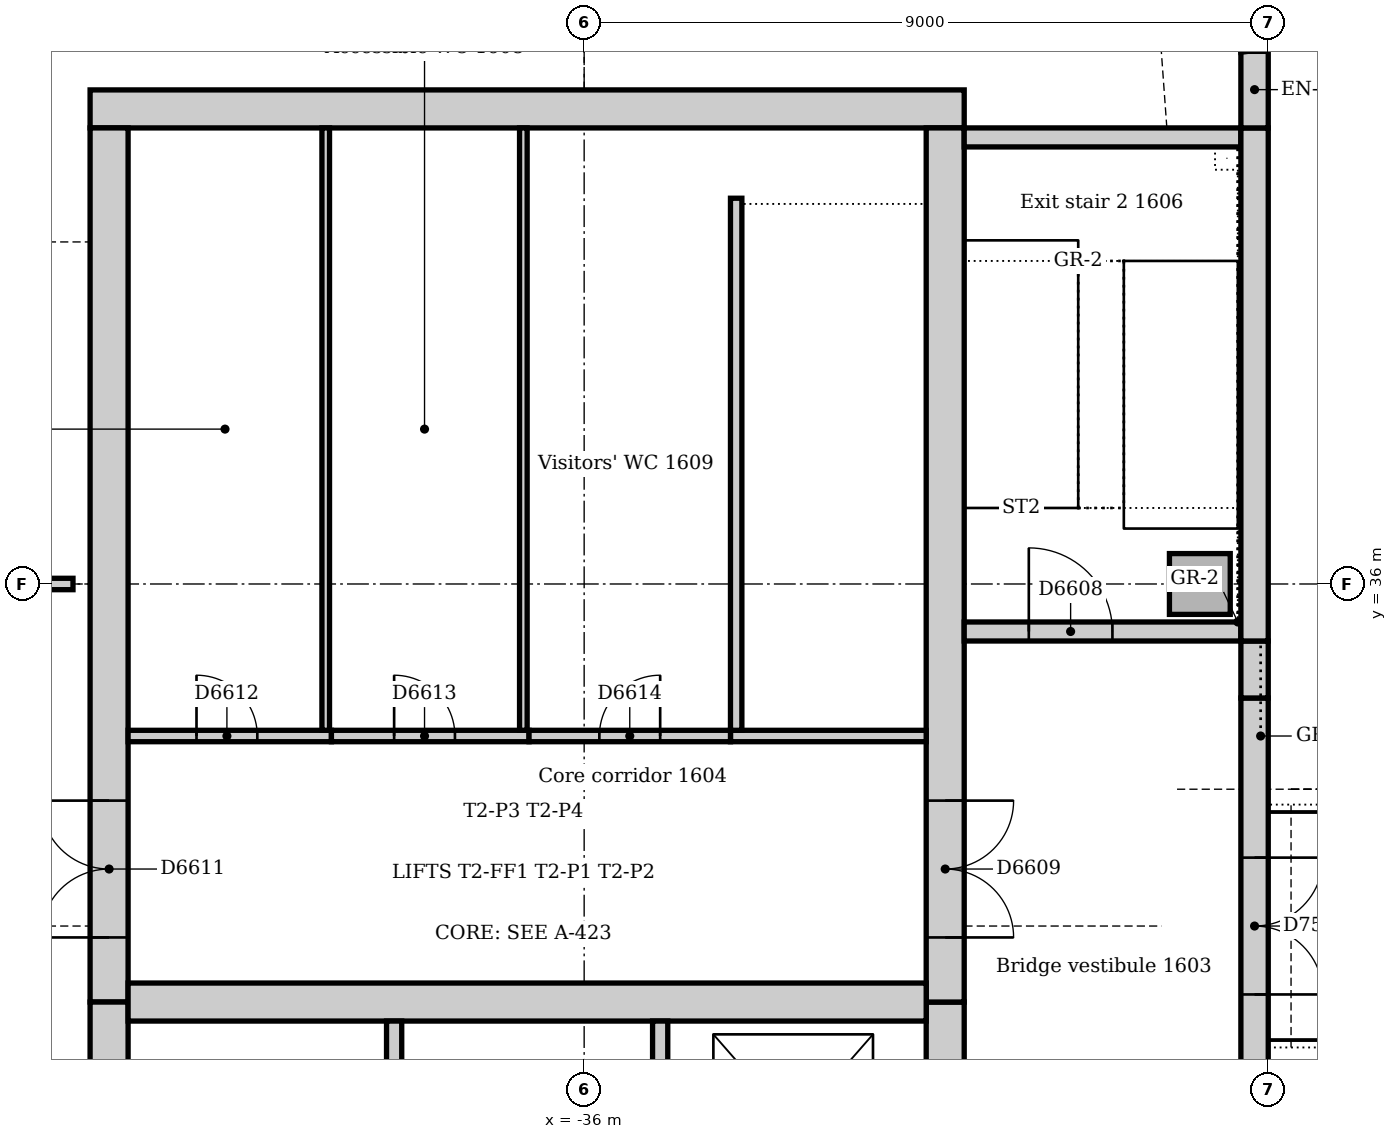
"""IFC4 building model, lengths in metres.
Left out: names, types, materials, properties, quantities, classifications, styles, units other than length and angle.
Written with IfcOpenShell. Run it as: python <this file> out.ifc"""

import sys

from ifc_helpers import new_model, si_unit, direction, frame, frame_2d, origin, origin_2d, place, context, subcontext, project, spatial, rectangle, extrude, element, fill, save


model = new_model("IFC4")
c1 = context("Model", 3, precision=1e-05, world=origin(), true_north=direction((0.0, 1.0)))
c2 = subcontext(c1, "Body", "Model", "MODEL_VIEW")
j1 = project(units=[si_unit("LENGTHUNIT", "METRE"), si_unit("PLANEANGLEUNIT", "RADIAN")], contexts=[c1])
p1 = place(None, origin())
s1 = spatial("IfcSite", under=j1, at=p1, CompositionType="ELEMENT")
p2 = place(p1, origin())
s2 = spatial("IfcBuilding", under=s1, at=p2, CompositionType="ELEMENT")
p3 = place(p2, frame((0.0, 0.0, 71.0)))
s3 = spatial("IfcBuildingStorey", under=s2, at=p3, CompositionType="ELEMENT", Elevation=71.0)
p4 = place(p3, frame((-31.0, 42.25, 0.0), z_axis=(0.0, 0.0, 1.0), x_axis=(-1.0, 0.0, 0.0)))
e1 = element("IfcWall", 1, at=p4, inside=s3, PredefinedType="SOLIDWALL", context=c2, shape_type="SweptSolid", body=[
    extrude(rectangle(XDim=11.5, YDim=0.5, at=frame_2d((5.75, 0.0))), origin(), (0.0, 0.0, 1.0), 4.0),
])
p5 = place(p3, frame((-31.25, 21.0, 0.0), z_axis=(0.0, 0.0, 1.0), x_axis=(0.0, 1.0, 0.0)))
e2 = element("IfcWall", 2, at=p5, inside=s3, PredefinedType="SOLIDWALL", context=c2, shape_type="SweptSolid", body=[
    extrude(rectangle(XDim=9.5, YDim=0.5, at=frame_2d((4.75, 0.0))), origin(), (0.0, 0.0, 1.0), 4.0),
])
p6 = place(p5, frame((5.25, 0.0, 0.0)))
e3 = element("IfcOpeningElement", 3, at=p6, cuts=e2, PredefinedType="OPENING", context=c2, shape_type="SweptSolid", body=[
    extrude(rectangle(XDim=1.0, YDim=2.1, at=frame_2d((0.5, 1.05))), frame((0.0, 0.26, 0.0), z_axis=(0.0, -1.0, 0.0), x_axis=(1.0, 0.0, 0.0)), (0.0, 0.0, 1.0), 0.52),
])
p7 = place(p3, frame((-31.25, 30.5, 0.0), z_axis=(0.0, 0.0, 1.0), x_axis=(0.0, 1.0, 0.0)))
e4 = element("IfcWall", 4, at=p7, inside=s3, PredefinedType="SOLIDWALL", context=c2, shape_type="SweptSolid", body=[
    extrude(rectangle(XDim=11.5, YDim=0.5, at=frame_2d((5.75, 0.0))), origin(), (0.0, 0.0, 1.0), 4.0),
])
p8 = place(p7, frame((0.85, 0.0, 0.0)))
e5 = element("IfcOpeningElement", 5, at=p8, cuts=e4, PredefinedType="OPENING", context=c2, shape_type="SweptSolid", body=[
    extrude(rectangle(XDim=1.8, YDim=2.1, at=frame_2d((0.9, 1.05))), frame((0.0, 0.26, 0.0), z_axis=(0.0, -1.0, 0.0), x_axis=(1.0, 0.0, 0.0)), (0.0, 0.0, 1.0), 0.52),
])
p9 = place(p3, frame((-42.25, 42.0, 0.0), z_axis=(0.0, 0.0, 1.0), x_axis=(0.0, -1.0, 0.0)))
e6 = element("IfcWall", 6, at=p9, inside=s3, PredefinedType="SOLIDWALL", context=c2, shape_type="SweptSolid", body=[
    extrude(rectangle(XDim=11.5, YDim=0.5, at=frame_2d((5.75, 0.0))), origin(), (0.0, 0.0, 1.0), 4.0),
])
p10 = place(p9, frame((8.85, 0.0, 0.0)))
e7 = element("IfcOpeningElement", 7, at=p10, cuts=e6, PredefinedType="OPENING", context=c2, shape_type="SweptSolid", body=[
    extrude(rectangle(XDim=1.8, YDim=2.1, at=frame_2d((0.9, 1.05))), frame((0.0, 0.26, 0.0), z_axis=(0.0, -1.0, 0.0), x_axis=(1.0, 0.0, 0.0)), (0.0, 0.0, 1.0), 0.52),
])
p11 = place(p3, frame((-42.25, 30.5, 0.0), z_axis=(0.0, 0.0, 1.0), x_axis=(0.0, -1.0, 0.0)))
e8 = element("IfcWall", 8, at=p11, inside=s3, PredefinedType="SOLIDWALL", context=c2, shape_type="SweptSolid", body=[
    extrude(rectangle(XDim=9.5, YDim=0.5, at=frame_2d((4.75, 0.0))), origin(), (0.0, 0.0, 1.0), 4.0),
])
p12 = place(p11, frame((3.85, 0.0, 0.0)))
e9 = element("IfcOpeningElement", 9, at=p12, cuts=e8, PredefinedType="OPENING", context=c2, shape_type="SweptSolid", body=[
    extrude(rectangle(XDim=1.8, YDim=2.1, at=frame_2d((0.9, 1.05))), frame((0.0, 0.26, 0.0), z_axis=(0.0, -1.0, 0.0), x_axis=(1.0, 0.0, 0.0)), (0.0, 0.0, 1.0), 0.52),
])
p13 = place(p3, frame((-42.0, 30.5, 0.0), z_axis=(0.0, 0.0, 1.0), x_axis=(1.0, 0.0, 0.0)))
e10 = element("IfcWall", 10, at=p13, inside=s3, PredefinedType="SOLIDWALL", context=c2, shape_type="SweptSolid", body=[
    extrude(rectangle(XDim=10.5, YDim=0.5, at=frame_2d((5.25, 0.0))), origin(), (0.0, 0.0, 1.0), 4.0),
])
p14 = place(p3, frame((-31.0, 35.375, 0.0), z_axis=(0.0, 0.0, 1.0), x_axis=(1.0, 0.0, 0.0)))
e11 = element("IfcWall", 11, at=p14, inside=s3, PredefinedType="SOLIDWALL", context=c2, shape_type="SweptSolid", body=[
    extrude(rectangle(XDim=3.64, YDim=0.25, at=frame_2d((1.82, 0.0))), origin(), (0.0, 0.0, 1.0), 4.0),
])
p15 = place(p14, frame((0.85, 0.0, 0.0)))
e12 = element("IfcOpeningElement", 12, at=p15, cuts=e11, PredefinedType="OPENING", context=c2, shape_type="SweptSolid", body=[
    extrude(rectangle(XDim=1.1, YDim=2.1, at=frame_2d((0.55, 1.05))), frame((0.0, 0.135, 0.0), z_axis=(0.0, -1.0, 0.0), x_axis=(1.0, 0.0, 0.0)), (0.0, 0.0, 1.0), 0.27),
])
p16 = place(p3, frame((-27.36, 41.875, 0.0), z_axis=(0.0, 0.0, 1.0), x_axis=(-1.0, 0.0, 0.0)))
e13 = element("IfcWall", 13, at=p16, inside=s3, PredefinedType="SOLIDWALL", context=c2, shape_type="SweptSolid", body=[
    extrude(rectangle(XDim=3.64, YDim=0.25, at=frame_2d((1.82, 0.0))), origin(), (0.0, 0.0, 1.0), 4.0),
])
p17 = place(p3, frame((-27.9, 36.0, 0.0), z_axis=(0.0, 0.0, 1.0), x_axis=(1.0, 0.0, 0.0)))
e14 = element("IfcColumn", 14, at=p17, inside=s3, PredefinedType="COLUMN", context=c2, shape_type="SweptSolid", body=[
    extrude(rectangle(XDim=0.8, YDim=0.8, at=origin_2d()), origin(), (0.0, 0.0, 1.0), 4.0),
])
p18 = place(p3, frame((-27.18, 28.5, 0.0), z_axis=(0.0, 0.0, 1.0), x_axis=(0.0, 1.0, 0.0)))
e15 = element("IfcWall", 15, at=p18, inside=s3, PredefinedType="STANDARD", context=c2, shape_type="SweptSolid", body=[
    extrude(rectangle(XDim=6.0, YDim=0.36, at=frame_2d((3.0, 0.0))), origin(), (0.0, 0.0, 1.0), 3.85),
])
p19 = place(p18, frame((2.1, 0.0, 0.0)))
e16 = element("IfcOpeningElement", 16, at=p19, cuts=e15, PredefinedType="OPENING", context=c2, shape_type="SweptSolid", body=[
    extrude(rectangle(XDim=1.8, YDim=2.4, at=frame_2d((0.9, 1.2))), frame((0.0, 0.19, 0.0), z_axis=(0.0, -1.0, 0.0), x_axis=(1.0, 0.0, 0.0)), (0.0, 0.0, 1.0), 0.38),
])
p20 = place(p3, frame((-27.18, 34.5, 0.0), z_axis=(0.0, 0.0, 1.0), x_axis=(0.0, 1.0, 0.0)))
e17 = element("IfcWall", 17, at=p20, inside=s3, PredefinedType="STANDARD", context=c2, shape_type="SweptSolid", body=[
    extrude(rectangle(XDim=0.75, YDim=0.36, at=frame_2d((0.375, 0.0))), origin(), (0.0, 0.0, 1.0), 3.85),
])
p21 = place(p3, frame((-27.18, 35.25, 0.0), z_axis=(0.0, 0.0, 1.0), x_axis=(0.0, 1.0, 0.0)))
e18 = element("IfcWall", 18, at=p21, inside=s3, PredefinedType="STANDARD", context=c2, shape_type="SweptSolid", body=[
    extrude(rectangle(XDim=6.75, YDim=0.36, at=frame_2d((3.375, 0.0))), origin(), (0.0, 0.0, 1.0), 3.85),
])
p22 = place(p3, frame((-27.18, 42.0, 0.0), z_axis=(0.0, 0.0, 1.0), x_axis=(0.0, 1.0, 0.0)))
e19 = element("IfcWall", 19, at=p22, inside=s3, PredefinedType="STANDARD", context=c2, shape_type="SweptSolid", body=[
    extrude(rectangle(XDim=1.007, YDim=0.36, at=frame_2d((0.504, 0.0))), origin(), (0.0, 0.0, 1.0), 3.85),
])
p23 = place(p3, frame((-27.183, 43.019, 0.0), z_axis=(0.0, 0.0, 1.0), x_axis=(-0.13055608231, 0.99144092581, 0.0)))
e20 = element("IfcWall", 20, at=p23, inside=s3, PredefinedType="STANDARD", context=c2, shape_type="SweptSolid", body=[
    extrude(rectangle(XDim=0.713, YDim=0.36, at=frame_2d((0.356, 0.0))), origin(), (0.0, 0.0, 1.0), 3.85),
])
for number, where, z_axis, x_axis in (
    (21, (-38.5, 27.4, 0.0), (0.0, 0.0, 1.0), (0.0, 1.0, 0.0)),
    (22, (-35.0, 27.4, 0.0), (0.0, 0.0, 1.0), (0.0, 1.0, 0.0)),
):
    element("IfcWall", number, at=place(p3, frame(where, z_axis=z_axis, x_axis=x_axis)), inside=s3, PredefinedType="SOLIDWALL", context=c2, shape_type="SweptSolid", body=[
        extrude(rectangle(XDim=2.85, YDim=0.2, at=frame_2d((1.425, 0.0))), origin(), (0.0, 0.0, 1.0), 4.0),
    ])
p24 = place(p3, frame((-34.075, 34.0, 0.0), z_axis=(0.0, 0.0, 1.0), x_axis=(1.0, 0.0, 0.0)))
e23 = element("IfcWall", 23, at=p24, inside=s3, PredefinedType="SOLIDWALL", context=c2, shape_type="SweptSolid", body=[
    extrude(rectangle(XDim=2.575, YDim=0.15, at=frame_2d((1.288, 0.0))), origin(), (0.0, 0.0, 1.0), 4.0),
])
p25 = place(p3, frame((-34.0, 41.075, 0.0), z_axis=(0.0, 0.0, 1.0), x_axis=(0.0, -1.0, 0.0)))
e24 = element("IfcWall", 24, at=p25, inside=s3, PredefinedType="SOLIDWALL", context=c2, shape_type="SweptSolid", body=[
    extrude(rectangle(XDim=7.0, YDim=0.15, at=frame_2d((3.5, 0.0))), origin(), (0.0, 0.0, 1.0), 4.0),
])
p26 = place(p3, frame((-39.325, 34.0, 0.0), z_axis=(0.0, 0.0, 1.0), x_axis=(-1.0, 0.0, 0.0)))
e25 = element("IfcWall", 25, at=p26, inside=s3, PredefinedType="PARTITIONING", context=c2, shape_type="SweptSolid", body=[
    extrude(rectangle(XDim=2.675, YDim=0.15, at=frame_2d((1.337, 0.0))), origin(), (0.0, 0.0, 1.0), 3.85),
])
p27 = place(p26, frame((0.975, 0.0, 0.0)))
e26 = element("IfcOpeningElement", 26, at=p27, cuts=e25, PredefinedType="OPENING", context=c2, shape_type="SweptSolid", body=[
    extrude(rectangle(XDim=0.8, YDim=2.1, at=frame_2d((0.4, 1.05))), frame((0.0, 0.085, 0.0), z_axis=(0.0, -1.0, 0.0), x_axis=(1.0, 0.0, 0.0)), (0.0, 0.0, 1.0), 0.17),
])
p28 = place(p3, frame((-36.725, 34.0, 0.0), z_axis=(0.0, 0.0, 1.0), x_axis=(-1.0, 0.0, 0.0)))
e27 = element("IfcWall", 27, at=p28, inside=s3, PredefinedType="PARTITIONING", context=c2, shape_type="SweptSolid", body=[
    extrude(rectangle(XDim=2.6, YDim=0.15, at=frame_2d((1.3, 0.0))), origin(), (0.0, 0.0, 1.0), 3.85),
])
p29 = place(p28, frame((0.975, 0.0, 0.0)))
e28 = element("IfcOpeningElement", 28, at=p29, cuts=e27, PredefinedType="OPENING", context=c2, shape_type="SweptSolid", body=[
    extrude(rectangle(XDim=0.8, YDim=2.1, at=frame_2d((0.4, 1.05))), frame((0.0, 0.085, 0.0), z_axis=(0.0, -1.0, 0.0), x_axis=(1.0, 0.0, 0.0)), (0.0, 0.0, 1.0), 0.17),
])
p30 = place(p3, frame((-34.075, 34.0, 0.0), z_axis=(0.0, 0.0, 1.0), x_axis=(-1.0, 0.0, 0.0)))
e29 = element("IfcWall", 29, at=p30, inside=s3, PredefinedType="PARTITIONING", context=c2, shape_type="SweptSolid", body=[
    extrude(rectangle(XDim=2.65, YDim=0.15, at=frame_2d((1.325, 0.0))), origin(), (0.0, 0.0, 1.0), 3.85),
])
p31 = place(p30, frame((0.925, 0.0, 0.0)))
e30 = element("IfcOpeningElement", 30, at=p31, cuts=e29, PredefinedType="OPENING", context=c2, shape_type="SweptSolid", body=[
    extrude(rectangle(XDim=0.8, YDim=2.1, at=frame_2d((0.4, 1.05))), frame((0.0, 0.085, 0.0), z_axis=(0.0, -1.0, 0.0), x_axis=(1.0, 0.0, 0.0)), (0.0, 0.0, 1.0), 0.17),
])
for number, where, z_axis, x_axis in (
    (31, (-39.4, 34.075, 0.0), (0.0, 0.0, 1.0), (0.0, 1.0, 0.0)),
    (32, (-36.8, 34.075, 0.0), (0.0, 0.0, 1.0), (0.0, 1.0, 0.0)),
):
    element("IfcWall", number, at=place(p3, frame(where, z_axis=z_axis, x_axis=x_axis)), inside=s3, PredefinedType="PARTITIONING", context=c2, shape_type="SweptSolid", body=[
        extrude(rectangle(XDim=7.925, YDim=0.1, at=frame_2d((3.962, 0.0))), origin(), (0.0, 0.0, 1.0), 3.85),
    ])
p32 = place(p3, frame((-44.65, 36.0, 0.0), z_axis=(0.0, 0.0, 1.0), x_axis=(1.0, 0.0, 0.0)))
e33 = element("IfcWall", 33, at=p32, inside=s3, PredefinedType="PARTITIONING", context=c2, shape_type="SweptSolid", body=[
    extrude(rectangle(XDim=1.925, YDim=0.15, at=frame_2d((0.963, 0.0))), origin(), (0.0, 0.0, 1.0), 3.602),
])
p33 = place(p32, frame((0.5, 0.0, 0.0)))
e34 = element("IfcOpeningElement", 34, at=p33, cuts=e33, PredefinedType="OPENING", context=c2, shape_type="SweptSolid", body=[
    extrude(rectangle(XDim=0.9, YDim=2.1, at=frame_2d((0.45, 1.05))), frame((0.0, 0.085, 0.0), z_axis=(0.0, -1.0, 0.0), x_axis=(1.0, 0.0, 0.0)), (0.0, 0.0, 1.0), 0.17),
])
p34 = place(p19, frame((1.8, 0.0, 0.0), z_axis=(0.0, 0.0, 1.0), x_axis=(-1.0, 0.0, 0.0)))
e35 = element("IfcDoor", 35, at=p34, inside=s3, OperationType="DOUBLE_DOOR_SINGLE_SWING", PredefinedType="DOOR", context=c2, shape_type="SweptSolid", body=[
    extrude(rectangle(XDim=1.8, YDim=2.4, at=frame_2d((0.9, 1.2))), frame((0.0, -0.07, 0.0), z_axis=(0.0, -1.0, 0.0), x_axis=(1.0, 0.0, 0.0)), (0.0, 0.0, 1.0), 0.05),
])
fill(e16, e35)
p35 = place(p15, origin())
e36 = element("IfcDoor", 36, at=p35, inside=s3, OperationType="SINGLE_SWING_LEFT", PredefinedType="DOOR", context=c2, shape_type="SweptSolid", body=[
    extrude(rectangle(XDim=1.1, YDim=2.1, at=frame_2d((0.55, 1.05))), frame((0.0, 0.025, 0.0), z_axis=(0.0, -1.0, 0.0), x_axis=(1.0, 0.0, 0.0)), (0.0, 0.0, 1.0), 0.05),
])
fill(e12, e36)
p36 = place(p8, frame((1.8, 0.0, 0.0), z_axis=(0.0, 0.0, 1.0), x_axis=(-1.0, 0.0, 0.0)))
e37 = element("IfcDoor", 37, at=p36, inside=s3, OperationType="DOUBLE_DOOR_SINGLE_SWING", PredefinedType="DOOR", context=c2, shape_type="SweptSolid", body=[
    extrude(rectangle(XDim=1.8, YDim=2.1, at=frame_2d((0.9, 1.05))), frame((0.0, 0.025, 0.0), z_axis=(0.0, -1.0, 0.0), x_axis=(1.0, 0.0, 0.0)), (0.0, 0.0, 1.0), 0.05),
])
fill(e5, e37)
p37 = place(p10, frame((1.8, 0.0, 0.0), z_axis=(0.0, 0.0, 1.0), x_axis=(-1.0, 0.0, 0.0)))
e38 = element("IfcDoor", 38, at=p37, inside=s3, OperationType="DOUBLE_DOOR_SINGLE_SWING", PredefinedType="DOOR", context=c2, shape_type="SweptSolid", body=[
    extrude(rectangle(XDim=1.8, YDim=2.1, at=frame_2d((0.9, 1.05))), frame((0.0, 0.025, 0.0), z_axis=(0.0, -1.0, 0.0), x_axis=(1.0, 0.0, 0.0)), (0.0, 0.0, 1.0), 0.05),
])
fill(e7, e38)
p38 = place(p27, frame((0.8, 0.0, 0.0), z_axis=(0.0, 0.0, 1.0), x_axis=(-1.0, 0.0, 0.0)))
e39 = element("IfcDoor", 39, at=p38, inside=s3, OperationType="SINGLE_SWING_LEFT", PredefinedType="DOOR", context=c2, shape_type="SweptSolid", body=[
    extrude(rectangle(XDim=0.8, YDim=2.1, at=frame_2d((0.4, 1.05))), frame((0.0, 0.025, 0.0), z_axis=(0.0, -1.0, 0.0), x_axis=(1.0, 0.0, 0.0)), (0.0, 0.0, 1.0), 0.05),
])
fill(e26, e39)
p39 = place(p29, frame((0.8, 0.0, 0.0), z_axis=(0.0, 0.0, 1.0), x_axis=(-1.0, 0.0, 0.0)))
e40 = element("IfcDoor", 40, at=p39, inside=s3, OperationType="SINGLE_SWING_LEFT", PredefinedType="DOOR", context=c2, shape_type="SweptSolid", body=[
    extrude(rectangle(XDim=0.8, YDim=2.1, at=frame_2d((0.4, 1.05))), frame((0.0, 0.025, 0.0), z_axis=(0.0, -1.0, 0.0), x_axis=(1.0, 0.0, 0.0)), (0.0, 0.0, 1.0), 0.05),
])
fill(e28, e40)
p40 = place(p31, frame((0.8, 0.0, 0.0), z_axis=(0.0, 0.0, 1.0), x_axis=(-1.0, 0.0, 0.0)))
e41 = element("IfcDoor", 41, at=p40, inside=s3, OperationType="SINGLE_SWING_RIGHT", PredefinedType="DOOR", context=c2, shape_type="SweptSolid", body=[
    extrude(rectangle(XDim=0.8, YDim=2.1, at=frame_2d((0.4, 1.05))), frame((0.0, 0.025, 0.0), z_axis=(0.0, -1.0, 0.0), x_axis=(1.0, 0.0, 0.0)), (0.0, 0.0, 1.0), 0.05),
])
fill(e30, e41)
save(model, sys.argv[1])
